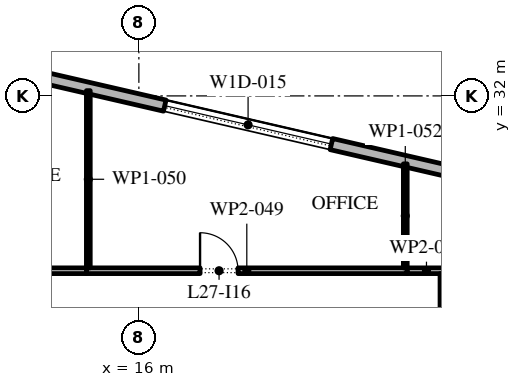
"""IFC4 building model, lengths in metres.
Left out: names, types, materials, properties, quantities, classifications, styles, units other than length and angle.
Written with IfcOpenShell. Run it as: python <this file> out.ifc"""

import sys

from ifc_helpers import new_model, si_unit, direction, frame, frame_2d, origin, place, context, subcontext, project, spatial, rectangle, extrude, element, fill, save


model = new_model("IFC4")
c1 = context("Model", 3, precision=1e-05, world=origin(), true_north=direction((0.0, 1.0)))
c2 = subcontext(c1, "Body", "Model", "MODEL_VIEW")
j1 = project(units=[si_unit("LENGTHUNIT", "METRE"), si_unit("PLANEANGLEUNIT", "RADIAN")], contexts=[c1])
p1 = place(None, origin())
s1 = spatial("IfcSite", under=j1, at=p1, CompositionType="ELEMENT")
p2 = place(p1, origin())
s2 = spatial("IfcBuilding", under=s1, at=p2, CompositionType="ELEMENT")
p3 = place(p2, frame((0.0, 0.0, 126.6)))
s3 = spatial("IfcBuildingStorey", under=s2, at=p3, CompositionType="ELEMENT", Elevation=126.6)
p4 = place(p3, frame((31.078, 28.421, 0.0), z_axis=(0.0, 0.0, 1.0), x_axis=(-0.974370456532, 0.224949357493, 0.0)))
e1 = element("IfcWall", 1, at=p4, inside=s3, PredefinedType="STANDARD", context=c2, shape_type="SweptSolid", body=[
    extrude(rectangle(XDim=51.0, YDim=0.3, at=frame_2d((25.5, 0.0))), origin(), (0.0, 0.0, 1.0), 4.0),
])
p5 = place(p4, frame((1.875, 0.0, 0.45)))
e2 = element("IfcOpeningElement", 2, at=p5, cuts=e1, PredefinedType="OPENING", context=c2, shape_type="SweptSolid", body=[
    extrude(rectangle(XDim=4.5, YDim=2.95, at=frame_2d((2.25, 1.475))), frame((0.0, 0.16, 0.0), z_axis=(0.0, -1.0, 0.0), x_axis=(1.0, 0.0, 0.0)), (0.0, 0.0, 1.0), 0.32),
])
p6 = place(p4, frame((10.275, 0.0, 0.45)))
e3 = element("IfcOpeningElement", 3, at=p6, cuts=e1, PredefinedType="OPENING", context=c2, shape_type="SweptSolid", body=[
    extrude(rectangle(XDim=4.5, YDim=2.875, at=frame_2d((2.25, 1.438))), frame((0.0, 0.16, 0.0), z_axis=(0.0, -1.0, 0.0), x_axis=(1.0, 0.0, 0.0)), (0.0, 0.0, 1.0), 0.32),
])
p7 = place(p4, frame((18.825, 0.0, 0.45)))
e4 = element("IfcOpeningElement", 4, at=p7, cuts=e1, PredefinedType="OPENING", context=c2, shape_type="SweptSolid", body=[
    extrude(rectangle(XDim=4.5, YDim=2.825, at=frame_2d((2.25, 1.413))), frame((0.0, 0.16, 0.0), z_axis=(0.0, -1.0, 0.0), x_axis=(1.0, 0.0, 0.0)), (0.0, 0.0, 1.0), 0.32),
])
p8 = place(p4, frame((27.075, 0.0, 0.0)))
e5 = element("IfcOpeningElement", 5, at=p8, cuts=e1, PredefinedType="OPENING", context=c2, shape_type="SweptSolid", body=[
    extrude(rectangle(XDim=2.4, YDim=3.125, at=frame_2d((1.2, 1.562))), frame((0.0, 0.16, 0.0), z_axis=(0.0, -1.0, 0.0), x_axis=(1.0, 0.0, 0.0)), (0.0, 0.0, 1.0), 0.32),
])
p9 = place(p4, frame((35.925, 0.0, 0.45)))
e6 = element("IfcOpeningElement", 6, at=p9, cuts=e1, PredefinedType="OPENING", context=c2, shape_type="SweptSolid", body=[
    extrude(rectangle(XDim=4.5, YDim=2.575, at=frame_2d((2.25, 1.288))), frame((0.0, 0.16, 0.0), z_axis=(0.0, -1.0, 0.0), x_axis=(1.0, 0.0, 0.0)), (0.0, 0.0, 1.0), 0.32),
])
p10 = place(p4, frame((44.475, 0.0, 0.45)))
e7 = element("IfcOpeningElement", 7, at=p10, cuts=e1, PredefinedType="OPENING", context=c2, shape_type="SweptSolid", body=[
    extrude(rectangle(XDim=4.5, YDim=3.05, at=frame_2d((2.25, 1.525))), frame((0.0, 0.16, 0.0), z_axis=(0.0, -1.0, 0.0), x_axis=(1.0, 0.0, 0.0)), (0.0, 0.0, 1.0), 0.32),
])
p11 = place(p3, frame((8.0, 27.4, 0.0), z_axis=(0.0, 0.0, 1.0), x_axis=(1.0, 0.0, 0.0)))
e8 = element("IfcWall", 8, at=p11, inside=s3, PredefinedType="PARTITIONING", context=c2, shape_type="SweptSolid", body=[
    extrude(rectangle(XDim=6.62, YDim=0.15, at=frame_2d((3.31, 0.0))), origin(), (0.0, 0.0, 1.0), 4.0),
])
p12 = place(p11, frame((1.52, 0.0, 0.0)))
e9 = element("IfcOpeningElement", 9, at=p12, cuts=e8, PredefinedType="OPENING", context=c2, shape_type="SweptSolid", body=[
    extrude(rectangle(XDim=1.0, YDim=2.1, at=frame_2d((0.5, 1.05))), frame((0.0, 0.085, 0.0), z_axis=(0.0, -1.0, 0.0), x_axis=(1.0, 0.0, 0.0)), (0.0, 0.0, 1.0), 0.17),
])
p13 = place(p3, frame((14.62, 27.4, 0.0), z_axis=(0.0, 0.0, 1.0), x_axis=(1.0, 0.0, 0.0)))
e10 = element("IfcWall", 10, at=p13, inside=s3, PredefinedType="PARTITIONING", context=c2, shape_type="SweptSolid", body=[
    extrude(rectangle(XDim=8.44, YDim=0.15, at=frame_2d((4.22, 0.0))), origin(), (0.0, 0.0, 1.0), 4.0),
])
p14 = place(p13, frame((2.99, 0.0, 0.0)))
e11 = element("IfcOpeningElement", 11, at=p14, cuts=e10, PredefinedType="OPENING", context=c2, shape_type="SweptSolid", body=[
    extrude(rectangle(XDim=1.0, YDim=2.1, at=frame_2d((0.5, 1.05))), frame((0.0, 0.085, 0.0), z_axis=(0.0, -1.0, 0.0), x_axis=(1.0, 0.0, 0.0)), (0.0, 0.0, 1.0), 0.17),
])
p15 = place(p3, frame((14.67, 32.138, 0.0), z_axis=(0.0, 0.0, 1.0), x_axis=(0.0, -1.0, 0.0)))
e12 = element("IfcWall", 12, at=p15, inside=s3, PredefinedType="PARTITIONING", context=c2, shape_type="SweptSolid", body=[
    extrude(rectangle(XDim=4.663, YDim=0.1, at=frame_2d((2.332, 0.0))), origin(), (0.0, 0.0, 1.0), 4.0),
])
p16 = place(p3, frame((23.06, 27.4, 0.0), z_axis=(0.0, 0.0, 1.0), x_axis=(1.0, 0.0, 0.0)))
e13 = element("IfcWall", 13, at=p16, inside=s3, PredefinedType="PARTITIONING", context=c2, shape_type="SweptSolid", body=[
    extrude(rectangle(XDim=1.015, YDim=0.15, at=frame_2d((0.507, 0.0))), origin(), (0.0, 0.0, 1.0), 4.0),
])
p17 = place(p3, frame((23.01, 30.212, 0.0), z_axis=(0.0, 0.0, 1.0), x_axis=(0.0, -1.0, 0.0)))
e14 = element("IfcWall", 14, at=p17, inside=s3, PredefinedType="PARTITIONING", context=c2, shape_type="SweptSolid", body=[
    extrude(rectangle(XDim=2.737, YDim=0.1, at=frame_2d((1.368, 0.0))), origin(), (0.0, 0.0, 1.0), 4.0),
])
p18 = place(p3, frame((24.0, 27.325, 0.0), z_axis=(0.0, 0.0, 1.0), x_axis=(0.0, -1.0, 0.0)))
e15 = element("IfcWall", 15, at=p18, inside=s3, PredefinedType="PARTITIONING", context=c2, shape_type="SweptSolid", body=[
    extrude(rectangle(XDim=10.845, YDim=0.15, at=frame_2d((5.422, 0.0))), origin(), (0.0, 0.0, 1.0), 4.0),
])
p19 = place(p18, frame((3.695, 0.0, 0.0)))
e16 = element("IfcOpeningElement", 16, at=p19, cuts=e15, PredefinedType="OPENING", context=c2, shape_type="SweptSolid", body=[
    extrude(rectangle(XDim=1.0, YDim=2.1, at=frame_2d((0.5, 1.05))), frame((0.0, 0.085, 0.0), z_axis=(0.0, -1.0, 0.0), x_axis=(1.0, 0.0, 0.0)), (0.0, 0.0, 1.0), 0.17),
])
p20 = place(p6, origin())
e17 = element("IfcWindow", 17, at=p20, inside=s3, PartitioningType="DOUBLE_PANEL_VERTICAL", PredefinedType="WINDOW", context=c2, shape_type="SweptSolid", body=[
    extrude(rectangle(XDim=4.5, YDim=2.875, at=frame_2d((2.25, 1.438))), frame((0.0, 0.03, 0.0), z_axis=(0.0, -1.0, 0.0), x_axis=(1.0, 0.0, 0.0)), (0.0, 0.0, 1.0), 0.06),
])
fill(e3, e17)
p21 = place(p14, origin())
e18 = element("IfcDoor", 18, at=p21, inside=s3, OperationType="SINGLE_SWING_RIGHT", PredefinedType="DOOR", context=c2, shape_type="SweptSolid", body=[
    extrude(rectangle(XDim=1.0, YDim=2.1, at=frame_2d((0.5, 1.05))), frame((0.0, 0.025, 0.0), z_axis=(0.0, -1.0, 0.0), x_axis=(1.0, 0.0, 0.0)), (0.0, 0.0, 1.0), 0.05),
])
fill(e11, e18)
save(model, sys.argv[1])
